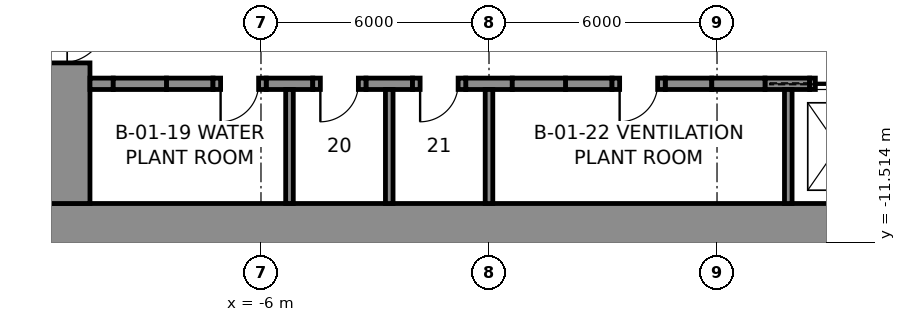
"""IFC4 building model, lengths in metres.
Left out: names, types, materials, properties, quantities, classifications, styles, units other than length and angle.
Written with IfcOpenShell. Run it as: python <this file> out.ifc"""

import sys

from ifc_helpers import new_model, si_unit, direction, frame, frame_2d, origin, place, context, subcontext, project, spatial, rectangle, extrude, element, fill, save


model = new_model("IFC4")
c1 = context("Model", 3, precision=1e-05, world=origin(), true_north=direction((0.0, 1.0)))
c2 = subcontext(c1, "Body", "Model", "MODEL_VIEW")
j1 = project(units=[si_unit("LENGTHUNIT", "METRE"), si_unit("PLANEANGLEUNIT", "RADIAN")], contexts=[c1])
p1 = place(None, origin())
s1 = spatial("IfcSite", under=j1, at=p1, CompositionType="ELEMENT")
p2 = place(p1, origin())
s2 = spatial("IfcBuilding", under=s1, at=p2, CompositionType="ELEMENT")
p3 = place(p2, frame((0.0, 0.0, -5.0)))
s3 = spatial("IfcBuildingStorey", under=s2, at=p3, CompositionType="ELEMENT", Elevation=-5.0)
p4 = place(p3, frame((12.0, -11.25, -0.3), z_axis=(0.0, 0.0, 1.0), x_axis=(-1.0, 0.0, 0.0)))
e1 = element("IfcWall", 1, at=p4, inside=s3, PredefinedType="SHEAR", context=c2, shape_type="SweptSolid", body=[
    extrude(rectangle(XDim=24.0, YDim=1.5, at=frame_2d((12.0, 0.0))), origin(), (0.0, 0.0, 1.0), 5.3),
])
p5 = place(p3, frame((-11.25, -10.5, -0.3), z_axis=(0.0, 0.0, 1.0), x_axis=(0.0, 1.0, 0.0)))
e2 = element("IfcWall", 2, at=p5, inside=s3, PredefinedType="SHEAR", context=c2, shape_type="SweptSolid", body=[
    extrude(rectangle(XDim=21.0, YDim=1.5, at=frame_2d((10.5, 0.0))), origin(), (0.0, 0.0, 1.0), 5.3),
])
p6 = place(p5, frame((16.1, 0.0, 0.3)))
e3 = element("IfcOpeningElement", 3, at=p6, cuts=e2, PredefinedType="OPENING", context=c2, shape_type="SweptSolid", body=[
    extrude(rectangle(XDim=1.2, YDim=2.3, at=frame_2d((0.6, 1.15))), frame((0.0, 0.76, 0.0), z_axis=(0.0, -1.0, 0.0), x_axis=(1.0, 0.0, 0.0)), (0.0, 0.0, 1.0), 1.52),
])
p7 = place(p5, frame((3.7, 0.0, 0.3)))
e4 = element("IfcOpeningElement", 4, at=p7, cuts=e2, PredefinedType="OPENING", context=c2, shape_type="SweptSolid", body=[
    extrude(rectangle(XDim=1.2, YDim=2.3, at=frame_2d((0.6, 1.15))), frame((0.0, 0.76, 0.0), z_axis=(0.0, -1.0, 0.0), x_axis=(1.0, 0.0, 0.0)), (0.0, 0.0, 1.0), 1.52),
])
p8 = place(p3, frame((-10.5, -7.35, -0.3), z_axis=(0.0, 0.0, 1.0), x_axis=(1.0, 0.0, 0.0)))
e5 = element("IfcWall", 5, at=p8, inside=s3, PredefinedType="SHEAR", context=c2, shape_type="SweptSolid", body=[
    extrude(rectangle(XDim=0.613, YDim=0.3, at=frame_2d((0.306, 0.0))), origin(), (0.0, 0.0, 1.0), 5.3),
])
for number, where, z_axis, x_axis in (
    (6, (-8.488, -7.35, -0.3), (0.0, 0.0, 1.0), (1.0, 0.0, 0.0)),
    (7, (-5.863, -7.35, -0.3), (0.0, 0.0, 1.0), (1.0, 0.0, 0.0)),
    (8, (-3.238, -7.35, -0.3), (0.0, 0.0, 1.0), (1.0, 0.0, 0.0)),
    (9, (-0.613, -7.35, -0.3), (0.0, 0.0, 1.0), (1.0, 0.0, 0.0)),
    (10, (2.012, -7.35, -0.3), (0.0, 0.0, 1.0), (1.0, 0.0, 0.0)),
    (11, (4.637, -7.35, -0.3), (0.0, 0.0, 1.0), (1.0, 0.0, 0.0)),
):
    element("IfcWall", number, at=place(p3, frame(where, z_axis=z_axis, x_axis=x_axis)), inside=s3, PredefinedType="SHEAR", context=c2, shape_type="SweptSolid", body=[
        extrude(rectangle(XDim=1.225, YDim=0.3, at=frame_2d((0.613, 0.0))), origin(), (0.0, 0.0, 1.0), 5.3),
    ])
p9 = place(p3, frame((7.262, -7.35, -0.3), z_axis=(0.0, 0.0, 1.0), x_axis=(1.0, 0.0, 0.0)))
e12 = element("IfcWall", 12, at=p9, inside=s3, PredefinedType="SHEAR", context=c2, shape_type="SweptSolid", body=[
    extrude(rectangle(XDim=1.175, YDim=0.3, at=frame_2d((0.587, 0.0))), origin(), (0.0, 0.0, 1.0), 5.3),
])
p10 = place(p3, frame((-9.887, -7.35, -0.3), z_axis=(0.0, 0.0, 1.0), x_axis=(1.0, 0.0, 0.0)))
e13 = element("IfcWall", 13, at=p10, inside=s3, PredefinedType="PARTITIONING", context=c2, shape_type="SweptSolid", body=[
    extrude(rectangle(XDim=1.4, YDim=0.3, at=frame_2d((0.7, 0.0))), origin(), (0.0, 0.0, 1.0), 5.3),
])
p11 = place(p3, frame((-7.262, -7.35, -0.3), z_axis=(0.0, 0.0, 1.0), x_axis=(1.0, 0.0, 0.0)))
e14 = element("IfcWall", 14, at=p11, inside=s3, PredefinedType="PARTITIONING", context=c2, shape_type="SweptSolid", body=[
    extrude(rectangle(XDim=1.4, YDim=0.3, at=frame_2d((0.7, 0.0))), origin(), (0.0, 0.0, 1.0), 5.3),
])
p12 = place(p11, frame((0.2, 0.0, 0.3)))
e15 = element("IfcOpeningElement", 15, at=p12, cuts=e14, PredefinedType="OPENING", context=c2, shape_type="SweptSolid", body=[
    extrude(rectangle(XDim=1.0, YDim=2.3, at=frame_2d((0.5, 1.15))), frame((0.0, 0.16, 0.0), z_axis=(0.0, -1.0, 0.0), x_axis=(1.0, 0.0, 0.0)), (0.0, 0.0, 1.0), 0.32),
])
p13 = place(p3, frame((-4.637, -7.35, -0.3), z_axis=(0.0, 0.0, 1.0), x_axis=(1.0, 0.0, 0.0)))
e16 = element("IfcWall", 16, at=p13, inside=s3, PredefinedType="PARTITIONING", context=c2, shape_type="SweptSolid", body=[
    extrude(rectangle(XDim=1.4, YDim=0.3, at=frame_2d((0.7, 0.0))), origin(), (0.0, 0.0, 1.0), 5.3),
])
p14 = place(p13, frame((0.2, 0.0, 0.3)))
e17 = element("IfcOpeningElement", 17, at=p14, cuts=e16, PredefinedType="OPENING", context=c2, shape_type="SweptSolid", body=[
    extrude(rectangle(XDim=1.0, YDim=2.3, at=frame_2d((0.5, 1.15))), frame((0.0, 0.16, 0.0), z_axis=(0.0, -1.0, 0.0), x_axis=(1.0, 0.0, 0.0)), (0.0, 0.0, 1.0), 0.32),
])
p15 = place(p3, frame((-2.012, -7.35, -0.3), z_axis=(0.0, 0.0, 1.0), x_axis=(1.0, 0.0, 0.0)))
e18 = element("IfcWall", 18, at=p15, inside=s3, PredefinedType="PARTITIONING", context=c2, shape_type="SweptSolid", body=[
    extrude(rectangle(XDim=1.4, YDim=0.3, at=frame_2d((0.7, 0.0))), origin(), (0.0, 0.0, 1.0), 5.3),
])
p16 = place(p15, frame((0.2, 0.0, 0.3)))
e19 = element("IfcOpeningElement", 19, at=p16, cuts=e18, PredefinedType="OPENING", context=c2, shape_type="SweptSolid", body=[
    extrude(rectangle(XDim=1.0, YDim=2.3, at=frame_2d((0.5, 1.15))), frame((0.0, 0.16, 0.0), z_axis=(0.0, -1.0, 0.0), x_axis=(1.0, 0.0, 0.0)), (0.0, 0.0, 1.0), 0.32),
])
p17 = place(p3, frame((0.613, -7.35, -0.3), z_axis=(0.0, 0.0, 1.0), x_axis=(1.0, 0.0, 0.0)))
e20 = element("IfcWall", 20, at=p17, inside=s3, PredefinedType="PARTITIONING", context=c2, shape_type="SweptSolid", body=[
    extrude(rectangle(XDim=1.4, YDim=0.3, at=frame_2d((0.7, 0.0))), origin(), (0.0, 0.0, 1.0), 5.3),
])
p18 = place(p3, frame((3.238, -7.35, -0.3), z_axis=(0.0, 0.0, 1.0), x_axis=(1.0, 0.0, 0.0)))
e21 = element("IfcWall", 21, at=p18, inside=s3, PredefinedType="PARTITIONING", context=c2, shape_type="SweptSolid", body=[
    extrude(rectangle(XDim=1.4, YDim=0.3, at=frame_2d((0.7, 0.0))), origin(), (0.0, 0.0, 1.0), 5.3),
])
p19 = place(p18, frame((0.2, 0.0, 0.3)))
e22 = element("IfcOpeningElement", 22, at=p19, cuts=e21, PredefinedType="OPENING", context=c2, shape_type="SweptSolid", body=[
    extrude(rectangle(XDim=1.0, YDim=2.3, at=frame_2d((0.5, 1.15))), frame((0.0, 0.16, 0.0), z_axis=(0.0, -1.0, 0.0), x_axis=(1.0, 0.0, 0.0)), (0.0, 0.0, 1.0), 0.32),
])
p20 = place(p3, frame((5.863, -7.35, -0.3), z_axis=(0.0, 0.0, 1.0), x_axis=(1.0, 0.0, 0.0)))
e23 = element("IfcWall", 23, at=p20, inside=s3, PredefinedType="PARTITIONING", context=c2, shape_type="SweptSolid", body=[
    extrude(rectangle(XDim=1.4, YDim=0.3, at=frame_2d((0.7, 0.0))), origin(), (0.0, 0.0, 1.0), 5.3),
])
p21 = place(p3, frame((8.438, -7.35, -0.3), z_axis=(0.0, 0.0, 1.0), x_axis=(1.0, 0.0, 0.0)))
e24 = element("IfcWall", 24, at=p21, inside=s3, PredefinedType="PARTITIONING", context=c2, shape_type="SweptSolid", body=[
    extrude(rectangle(XDim=1.5, YDim=0.3, at=frame_2d((0.75, 0.0))), origin(), (0.0, 0.0, 1.0), 5.3),
])
p22 = place(p21, frame((0.15, 0.0, 0.3)))
e25 = element("IfcOpeningElement", 25, at=p22, cuts=e24, PredefinedType="OPENING", context=c2, shape_type="SweptSolid", body=[
    extrude(rectangle(XDim=1.2, YDim=2.3, at=frame_2d((0.6, 1.15))), frame((0.0, 0.16, 0.0), z_axis=(0.0, -1.0, 0.0), x_axis=(1.0, 0.0, 0.0)), (0.0, 0.0, 1.0), 0.32),
])
for number, where, z_axis, x_axis in (
    (26, (-5.25, -10.5, -0.3), (0.0, 0.0, 1.0), (0.0, 1.0, 0.0)),
    (27, (-2.625, -10.5, -0.3), (0.0, 0.0, 1.0), (0.0, 1.0, 0.0)),
    (28, (0.0, -10.5, -0.3), (0.0, 0.0, 1.0), (0.0, 1.0, 0.0)),
    (29, (7.875, -10.5, -0.3), (0.0, 0.0, 1.0), (0.0, 1.0, 0.0)),
):
    element("IfcWall", number, at=place(p3, frame(where, z_axis=z_axis, x_axis=x_axis)), inside=s3, PredefinedType="PARTITIONING", context=c2, shape_type="SweptSolid", body=[
        extrude(rectangle(XDim=3.0, YDim=0.2, at=frame_2d((1.5, 0.0))), origin(), (0.0, 0.0, 1.0), 5.3),
    ])
p23 = place(p12, frame((1.0, 0.0, 0.0), z_axis=(0.0, 0.0, 1.0), x_axis=(-1.0, 0.0, 0.0)))
e30 = element("IfcDoor", 30, at=p23, inside=s3, OperationType="SINGLE_SWING_RIGHT", PredefinedType="DOOR", context=c2, shape_type="SweptSolid", body=[
    extrude(rectangle(XDim=1.0, YDim=2.3, at=frame_2d((0.5, 1.15))), frame((0.0, 0.025, 0.0), z_axis=(0.0, -1.0, 0.0), x_axis=(1.0, 0.0, 0.0)), (0.0, 0.0, 1.0), 0.05),
])
fill(e15, e30)
p24 = place(p14, frame((1.0, 0.0, 0.0), z_axis=(0.0, 0.0, 1.0), x_axis=(-1.0, 0.0, 0.0)))
e31 = element("IfcDoor", 31, at=p24, inside=s3, OperationType="SINGLE_SWING_RIGHT", PredefinedType="DOOR", context=c2, shape_type="SweptSolid", body=[
    extrude(rectangle(XDim=1.0, YDim=2.3, at=frame_2d((0.5, 1.15))), frame((0.0, 0.025, 0.0), z_axis=(0.0, -1.0, 0.0), x_axis=(1.0, 0.0, 0.0)), (0.0, 0.0, 1.0), 0.05),
])
fill(e17, e31)
p25 = place(p16, frame((1.0, 0.0, 0.0), z_axis=(0.0, 0.0, 1.0), x_axis=(-1.0, 0.0, 0.0)))
e32 = element("IfcDoor", 32, at=p25, inside=s3, OperationType="SINGLE_SWING_RIGHT", PredefinedType="DOOR", context=c2, shape_type="SweptSolid", body=[
    extrude(rectangle(XDim=1.0, YDim=2.3, at=frame_2d((0.5, 1.15))), frame((0.0, 0.025, 0.0), z_axis=(0.0, -1.0, 0.0), x_axis=(1.0, 0.0, 0.0)), (0.0, 0.0, 1.0), 0.05),
])
fill(e19, e32)
p26 = place(p19, frame((1.0, 0.0, 0.0), z_axis=(0.0, 0.0, 1.0), x_axis=(-1.0, 0.0, 0.0)))
e33 = element("IfcDoor", 33, at=p26, inside=s3, OperationType="SINGLE_SWING_RIGHT", PredefinedType="DOOR", context=c2, shape_type="SweptSolid", body=[
    extrude(rectangle(XDim=1.0, YDim=2.3, at=frame_2d((0.5, 1.15))), frame((0.0, 0.025, 0.0), z_axis=(0.0, -1.0, 0.0), x_axis=(1.0, 0.0, 0.0)), (0.0, 0.0, 1.0), 0.05),
])
fill(e22, e33)
p27 = place(p7, frame((1.2, 0.0, 0.0), z_axis=(0.0, 0.0, 1.0), x_axis=(-1.0, 0.0, 0.0)))
e34 = element("IfcDoor", 34, at=p27, inside=s3, OperationType="SINGLE_SWING_LEFT", PredefinedType="DOOR", context=c2, shape_type="SweptSolid", body=[
    extrude(rectangle(XDim=1.2, YDim=2.3, at=frame_2d((0.6, 1.15))), frame((0.0, 0.025, 0.0), z_axis=(0.0, -1.0, 0.0), x_axis=(1.0, 0.0, 0.0)), (0.0, 0.0, 1.0), 0.05),
])
fill(e4, e34)
p28 = place(p22, origin())
e35 = element("IfcDoor", 35, at=p28, inside=s3, OperationType="SLIDING_TO_LEFT", PredefinedType="DOOR", context=c2, shape_type="SweptSolid", body=[
    extrude(rectangle(XDim=1.2, YDim=2.3, at=frame_2d((0.6, 1.15))), frame((0.0, 0.025, 0.0), z_axis=(0.0, -1.0, 0.0), x_axis=(1.0, 0.0, 0.0)), (0.0, 0.0, 1.0), 0.05),
])
fill(e25, e35)
save(model, sys.argv[1])
